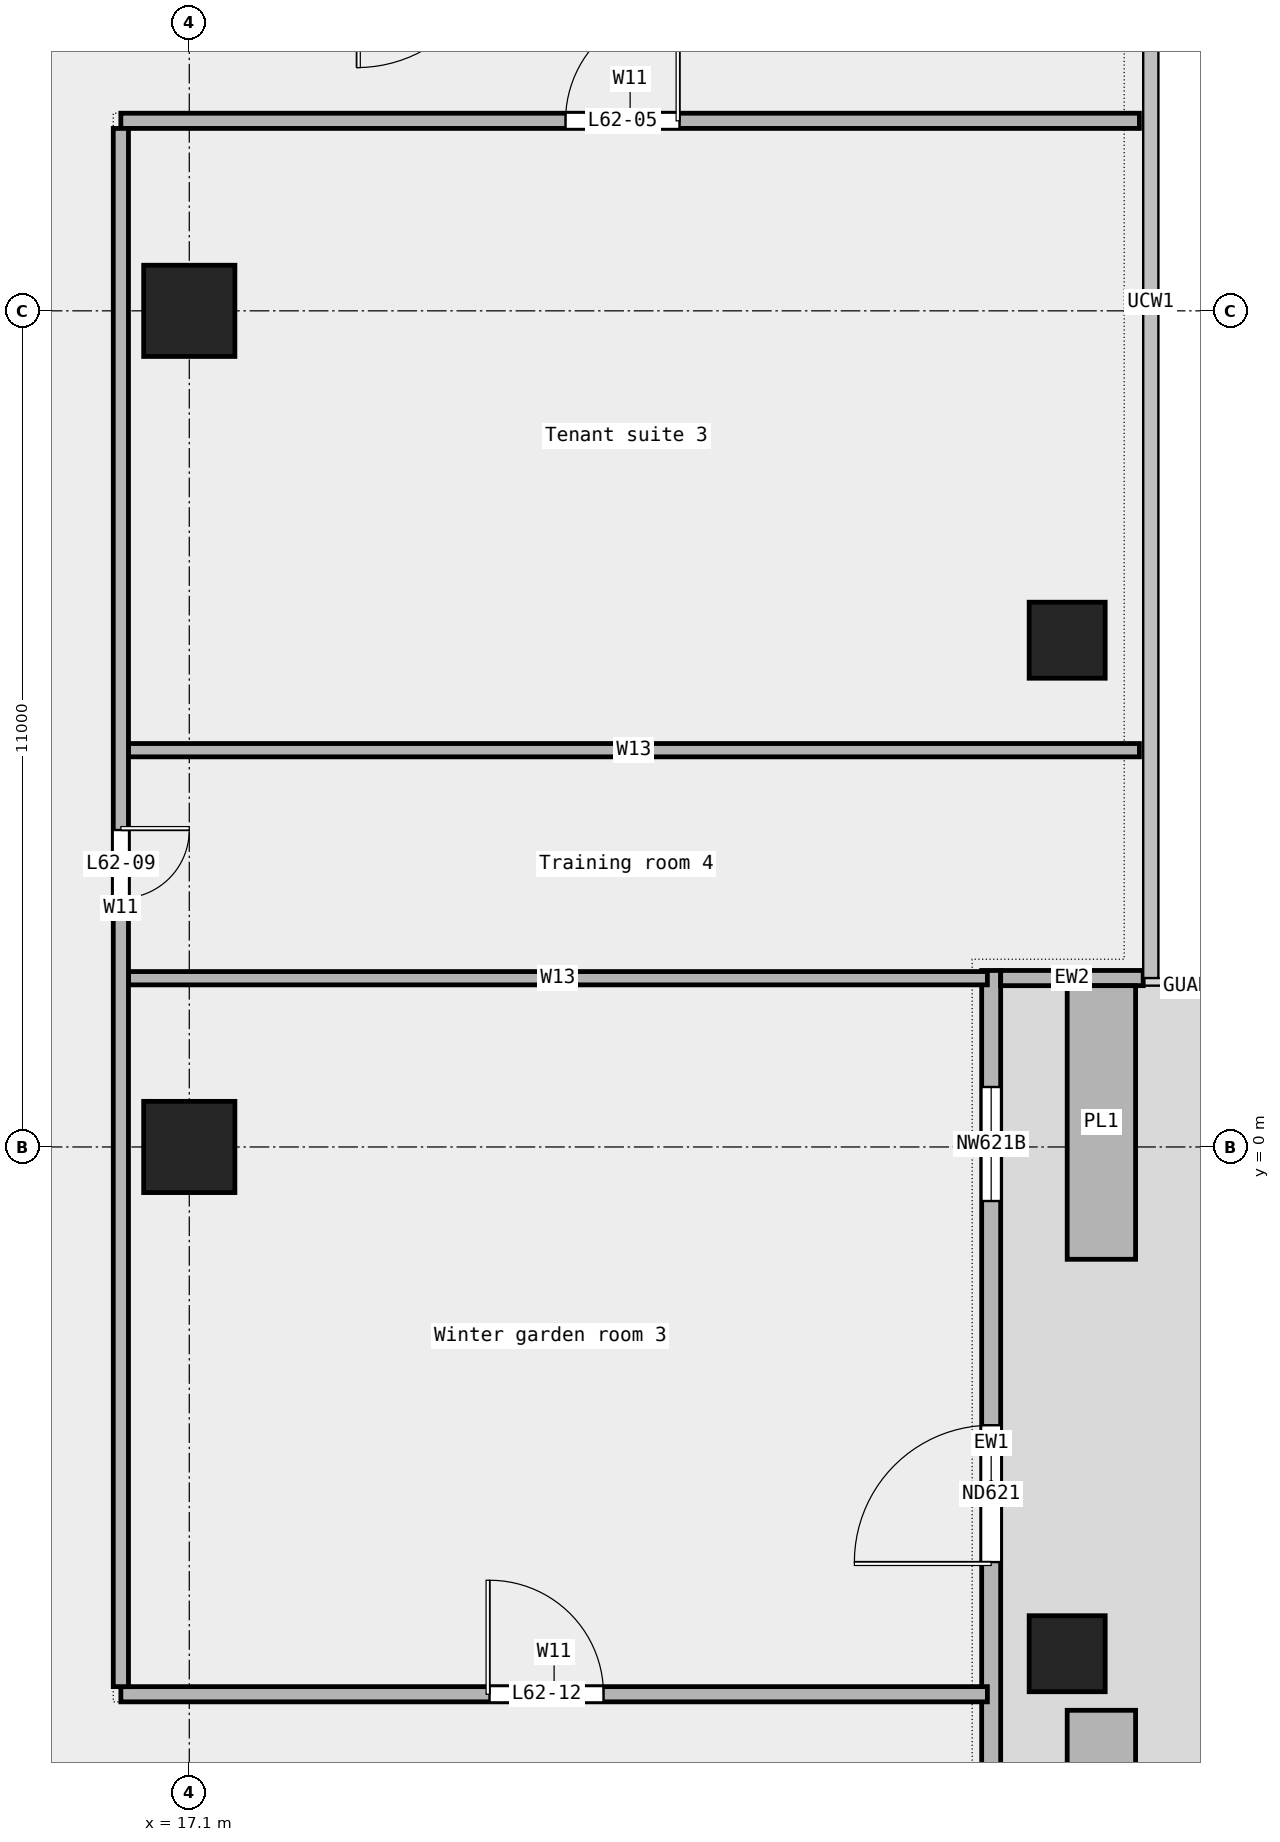
"""IFC4 building model, lengths in metres.
Left out: names, types, materials, properties, quantities, classifications, styles, units other than length and angle.
Written with IfcOpenShell. Run it as: python <this file> out.ifc"""

import sys

from ifc_helpers import new_model, si_unit, direction, frame, frame_2d, origin, origin_2d, place, context, subcontext, project, spatial, rectangle, extrude, element, fill, save


model = new_model("IFC4")
c1 = context("Model", 3, precision=1e-05, world=origin(), true_north=direction((0.0, 1.0)))
c2 = subcontext(c1, "Body", "Model", "MODEL_VIEW")
j1 = project(units=[si_unit("LENGTHUNIT", "METRE"), si_unit("PLANEANGLEUNIT", "RADIAN")], contexts=[c1])
p1 = place(None, origin())
s1 = spatial("IfcSite", under=j1, at=p1, CompositionType="ELEMENT")
p2 = place(p1, origin())
s2 = spatial("IfcBuilding", under=s1, at=p2, CompositionType="ELEMENT")
p3 = place(p2, frame((0.0, 0.0, 287.4)))
s3 = spatial("IfcBuildingStorey", under=s2, at=p3, CompositionType="ELEMENT", Elevation=287.4)
for number, where, z_axis, x_axis in (
    (1, (28.65, -6.667, 0.0), (0.0, 0.0, 1.0), (1.0, 0.0, 0.0)),
    (2, (28.65, 6.667, 0.0), (0.0, 0.0, 1.0), (1.0, 0.0, 0.0)),
):
    element("IfcColumn", number, at=place(p3, frame(where, z_axis=z_axis, x_axis=x_axis)), inside=s3, PredefinedType="COLUMN", context=c2, shape_type="SweptSolid", body=[
        extrude(rectangle(XDim=1.0, YDim=1.0, at=origin_2d()), origin(), (0.0, 0.0, 1.0), 3.6),
    ])
for number, where, z_axis, x_axis in (
    (3, (17.1, 0.0, 0.0), (0.0, 0.0, 1.0), (1.0, 0.0, 0.0)),
    (4, (17.1, 11.0, 0.0), (0.0, 0.0, 1.0), (1.0, 0.0, 0.0)),
):
    element("IfcColumn", number, at=place(p3, frame(where, z_axis=z_axis, x_axis=x_axis)), inside=s3, PredefinedType="COLUMN", context=c2, shape_type="SweptSolid", body=[
        extrude(rectangle(XDim=1.2, YDim=1.2, at=origin_2d()), origin(), (0.0, 0.0, 1.0), 3.6),
    ])
p4 = place(p3, frame((27.65, -11.211, 0.0), z_axis=(0.0, 0.0, 1.0), x_axis=(0.0, 1.0, 0.0)))
e5 = element("IfcWall", 5, at=p4, inside=s3, PredefinedType="STANDARD", context=c2, shape_type="SweptSolid", body=[
    extrude(rectangle(XDim=13.533, YDim=0.25, at=frame_2d((6.767, 0.0))), origin(), (0.0, 0.0, 1.0), 3.6),
])
p5 = place(p4, frame((1.5, 0.0, 0.45)))
e6 = element("IfcOpeningElement", 6, at=p5, cuts=e5, PredefinedType="OPENING", context=c2, shape_type="SweptSolid", body=[
    extrude(rectangle(XDim=1.5, YDim=2.4, at=frame_2d((0.75, 1.2))), frame((0.0, 0.137, 0.0), z_axis=(0.0, -1.0, 0.0), x_axis=(1.0, 0.0, 0.0)), (0.0, 0.0, 1.0), 0.274),
])
p6 = place(p4, frame((5.75, 0.0, 0.0)))
e7 = element("IfcOpeningElement", 7, at=p6, cuts=e5, PredefinedType="OPENING", context=c2, shape_type="SweptSolid", body=[
    extrude(rectangle(XDim=1.8, YDim=2.4, at=frame_2d((0.9, 1.2))), frame((0.0, 0.137, 0.0), z_axis=(0.0, -1.0, 0.0), x_axis=(1.0, 0.0, 0.0)), (0.0, 0.0, 1.0), 0.274),
])
p7 = place(p4, frame((10.5, 0.0, 0.45)))
e8 = element("IfcOpeningElement", 8, at=p7, cuts=e5, PredefinedType="OPENING", context=c2, shape_type="SweptSolid", body=[
    extrude(rectangle(XDim=1.5, YDim=2.4, at=frame_2d((0.75, 1.2))), frame((0.0, 0.137, 0.0), z_axis=(0.0, -1.0, 0.0), x_axis=(1.0, 0.0, 0.0)), (0.0, 0.0, 1.0), 0.274),
])
p8 = place(p3, frame((29.65, 2.222, 0.0), z_axis=(0.0, 0.0, 1.0), x_axis=(-1.0, 0.0, 0.0)))
e9 = element("IfcWall", 9, at=p8, inside=s3, PredefinedType="STANDARD", context=c2, shape_type="SweptSolid", body=[
    extrude(rectangle(XDim=1.875, YDim=0.2, at=frame_2d((0.938, 0.0))), origin(), (0.0, 0.0, 1.0), 3.6),
])
for number, where, z_axis, x_axis in (
    (10, (29.1, -11.011, 0.0), (0.0, 0.0, 1.0), (0.0, 1.0, 0.0)),
    (11, (29.1, -1.478, 0.0), (0.0, 0.0, 1.0), (0.0, 1.0, 0.0)),
):
    element("IfcWall", number, at=place(p3, frame(where, z_axis=z_axis, x_axis=x_axis)), inside=s3, PredefinedType="STANDARD", context=c2, shape_type="SweptSolid", body=[
        extrude(rectangle(XDim=3.6, YDim=0.9, at=frame_2d((1.8, 0.0))), origin(), (0.0, 0.0, 1.0), 0.7),
    ])
p9 = place(p3, frame((16.2, -7.2, 0.0), z_axis=(0.0, 0.0, 1.0), x_axis=(1.0, 0.0, 0.0)))
e12 = element("IfcWall", 12, at=p9, inside=s3, PredefinedType="PARTITIONING", context=c2, shape_type="SweptSolid", body=[
    extrude(rectangle(XDim=11.4, YDim=0.2, at=frame_2d((5.7, 0.0))), origin(), (0.0, 0.0, 1.0), 3.6),
])
p10 = place(p9, frame((4.85, 0.0, 0.0)))
e13 = element("IfcOpeningElement", 13, at=p10, cuts=e12, PredefinedType="OPENING", context=c2, shape_type="SweptSolid", body=[
    extrude(rectangle(XDim=1.5, YDim=2.1, at=frame_2d((0.75, 1.05))), frame((0.0, 0.112, 0.0), z_axis=(0.0, -1.0, 0.0), x_axis=(1.0, 0.0, 0.0)), (0.0, 0.0, 1.0), 0.224),
])
p11 = place(p3, frame((16.3, 2.22, 0.0), z_axis=(0.0, 0.0, 1.0), x_axis=(1.0, 0.0, 0.0)))
e14 = element("IfcWall", 14, at=p11, inside=s3, PredefinedType="PARTITIONING", context=c2, shape_type="SweptSolid", body=[
    extrude(rectangle(XDim=11.3, YDim=0.175, at=frame_2d((5.65, 0.0))), origin(), (0.0, 0.0, 1.0), 3.6),
])
p12 = place(p3, frame((16.3, 5.22, 0.0), z_axis=(0.0, 0.0, 1.0), x_axis=(1.0, 0.0, 0.0)))
e15 = element("IfcWall", 15, at=p12, inside=s3, PredefinedType="PARTITIONING", context=c2, shape_type="SweptSolid", body=[
    extrude(rectangle(XDim=13.3, YDim=0.175, at=frame_2d((6.65, 0.0))), origin(), (0.0, 0.0, 1.0), 3.6),
])
p13 = place(p3, frame((16.2, 13.5, 0.0), z_axis=(0.0, 0.0, 1.0), x_axis=(1.0, 0.0, 0.0)))
e16 = element("IfcWall", 16, at=p13, inside=s3, PredefinedType="PARTITIONING", context=c2, shape_type="SweptSolid", body=[
    extrude(rectangle(XDim=13.4, YDim=0.2, at=frame_2d((6.7, 0.0))), origin(), (0.0, 0.0, 1.0), 3.6),
])
p14 = place(p13, frame((5.85, 0.0, 0.0)))
e17 = element("IfcOpeningElement", 17, at=p14, cuts=e16, PredefinedType="OPENING", context=c2, shape_type="SweptSolid", body=[
    extrude(rectangle(XDim=1.5, YDim=2.1, at=frame_2d((0.75, 1.05))), frame((0.0, 0.112, 0.0), z_axis=(0.0, -1.0, 0.0), x_axis=(1.0, 0.0, 0.0)), (0.0, 0.0, 1.0), 0.224),
])
p15 = place(p3, frame((16.2, -7.1, 0.0), z_axis=(0.0, 0.0, 1.0), x_axis=(0.0, 1.0, 0.0)))
e18 = element("IfcWall", 18, at=p15, inside=s3, PredefinedType="PARTITIONING", context=c2, shape_type="SweptSolid", body=[
    extrude(rectangle(XDim=20.5, YDim=0.2, at=frame_2d((10.25, 0.0))), origin(), (0.0, 0.0, 1.0), 3.6),
])
p16 = place(p15, frame((10.37, 0.0, 0.0)))
e19 = element("IfcOpeningElement", 19, at=p16, cuts=e18, PredefinedType="OPENING", context=c2, shape_type="SweptSolid", body=[
    extrude(rectangle(XDim=0.9, YDim=2.1, at=frame_2d((0.45, 1.05))), frame((0.0, 0.112, 0.0), z_axis=(0.0, -1.0, 0.0), x_axis=(1.0, 0.0, 0.0)), (0.0, 0.0, 1.0), 0.224),
])
p17 = place(p6, origin())
e20 = element("IfcDoor", 20, at=p17, inside=s3, OperationType="DOUBLE_DOOR_SINGLE_SWING", PredefinedType="DOOR", context=c2, shape_type="SweptSolid", body=[
    extrude(rectangle(XDim=1.8, YDim=2.4, at=frame_2d((0.9, 1.2))), frame((0.0, 0.025, 0.0), z_axis=(0.0, -1.0, 0.0), x_axis=(1.0, 0.0, 0.0)), (0.0, 0.0, 1.0), 0.05),
])
fill(e7, e20)
p18 = place(p7, origin())
e21 = element("IfcWindow", 21, at=p18, inside=s3, PartitioningType="SINGLE_PANEL", PredefinedType="WINDOW", context=c2, shape_type="SweptSolid", body=[
    extrude(rectangle(XDim=1.5, YDim=2.4, at=frame_2d((0.75, 1.2))), frame((0.0, 0.03, 0.0), z_axis=(0.0, -1.0, 0.0), x_axis=(1.0, 0.0, 0.0)), (0.0, 0.0, 1.0), 0.06),
])
fill(e8, e21)
p19 = place(p14, origin())
e22 = element("IfcDoor", 22, at=p19, inside=s3, OperationType="DOUBLE_DOOR_SINGLE_SWING", PredefinedType="DOOR", context=c2, shape_type="SweptSolid", body=[
    extrude(rectangle(XDim=1.5, YDim=2.1, at=frame_2d((0.75, 1.05))), frame((0.0, 0.025, 0.0), z_axis=(0.0, -1.0, 0.0), x_axis=(1.0, 0.0, 0.0)), (0.0, 0.0, 1.0), 0.05),
])
fill(e17, e22)
p20 = place(p16, origin())
e23 = element("IfcDoor", 23, at=p20, inside=s3, OperationType="SINGLE_SWING_LEFT", PredefinedType="DOOR", context=c2, shape_type="SweptSolid", body=[
    extrude(rectangle(XDim=0.9, YDim=2.1, at=frame_2d((0.45, 1.05))), frame((0.0, 0.025, 0.0), z_axis=(0.0, -1.0, 0.0), x_axis=(1.0, 0.0, 0.0)), (0.0, 0.0, 1.0), 0.05),
])
fill(e19, e23)
p21 = place(p10, origin())
e24 = element("IfcDoor", 24, at=p21, inside=s3, OperationType="DOUBLE_DOOR_SINGLE_SWING", PredefinedType="DOOR", context=c2, shape_type="SweptSolid", body=[
    extrude(rectangle(XDim=1.5, YDim=2.1, at=frame_2d((0.75, 1.05))), frame((0.0, 0.025, 0.0), z_axis=(0.0, -1.0, 0.0), x_axis=(1.0, 0.0, 0.0)), (0.0, 0.0, 1.0), 0.05),
])
fill(e13, e24)
save(model, sys.argv[1])
